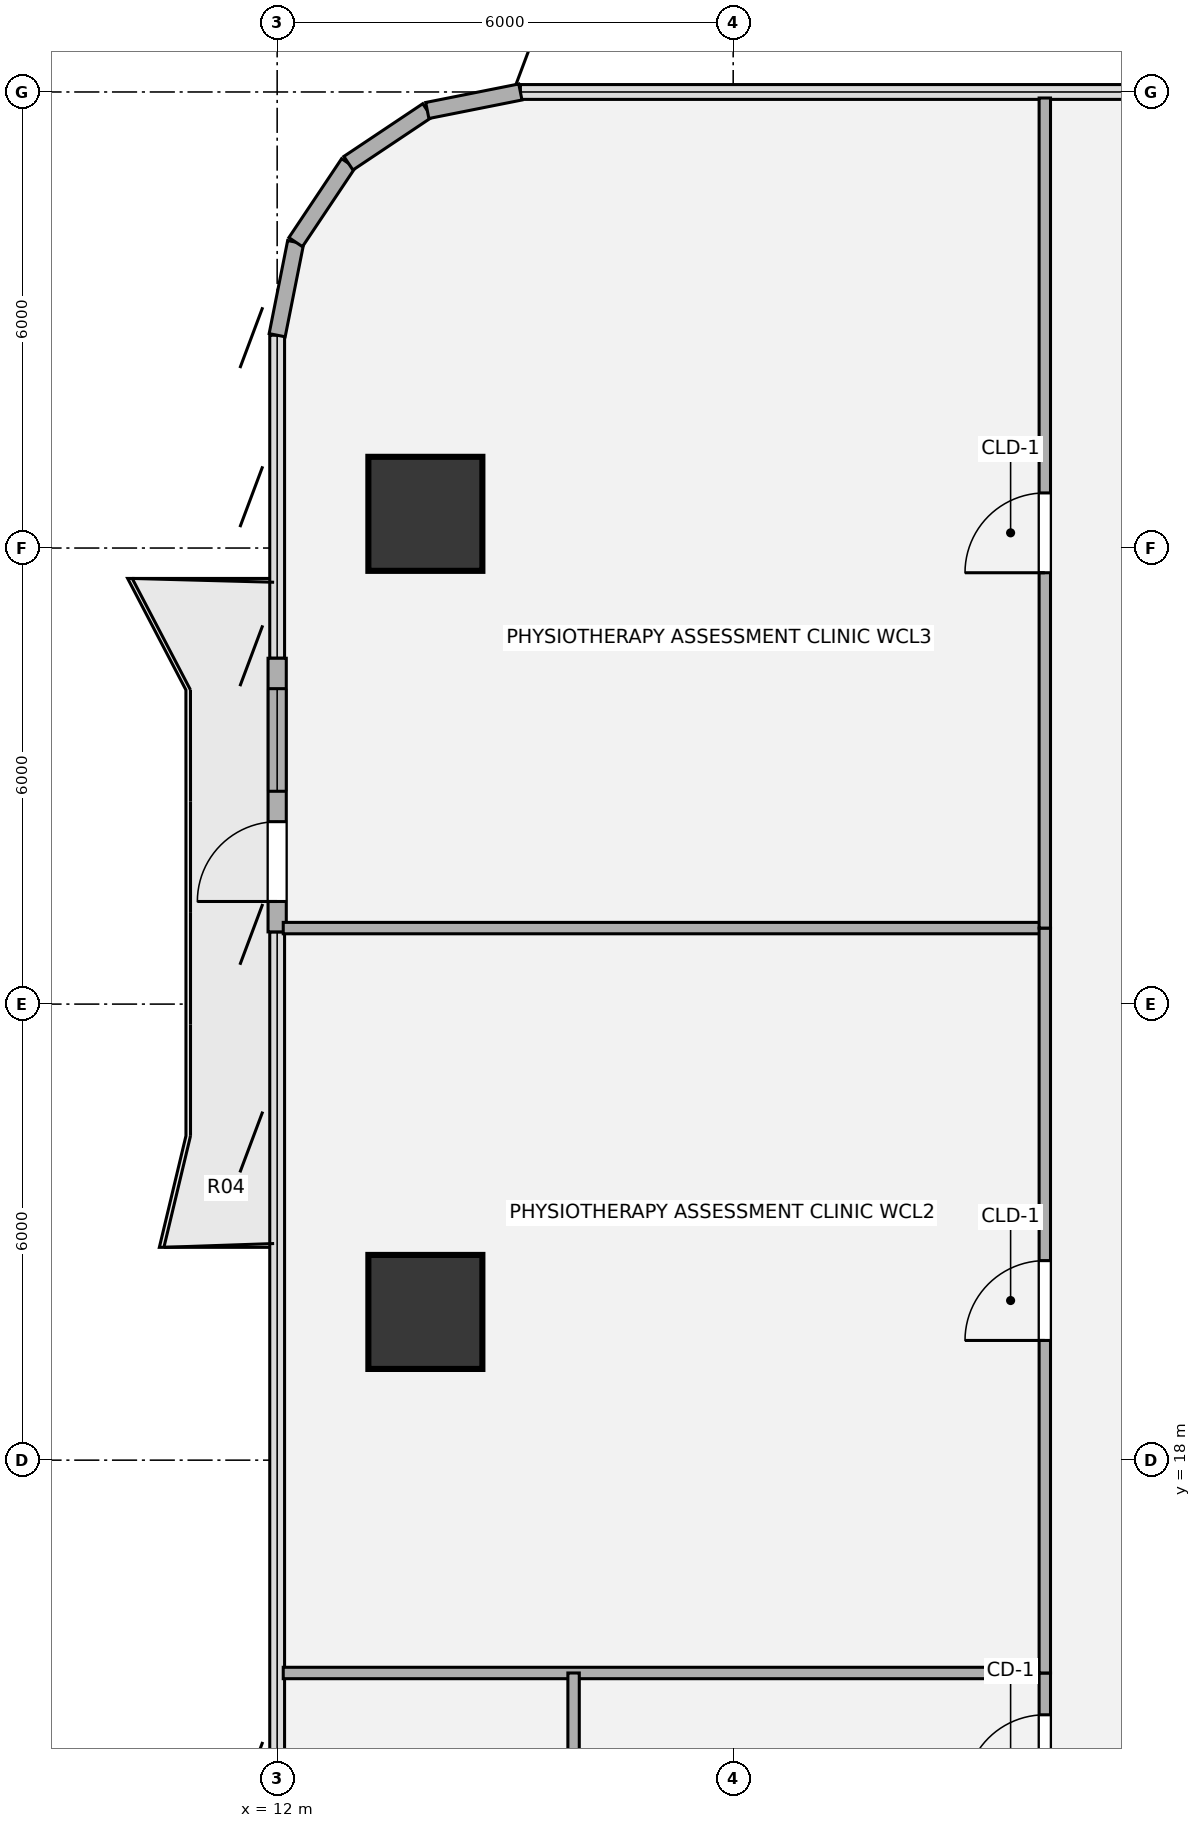
"""IFC4 building model, lengths in metres.
Left out: names, types, materials, properties, quantities, classifications, styles, units other than length and angle.
Written with IfcOpenShell. Run it as: python <this file> out.ifc"""

import sys

from ifc_helpers import new_model, si_unit, direction, frame, frame_2d, origin, origin_2d, place, context, subcontext, project, spatial, rectangle, hollow_circle, extrude, source, transform, mapped, element, fill, save


model = new_model("IFC4")
c1 = context("Model", 3, precision=1e-05, world=origin(), true_north=direction((0.0, 1.0)))
c2 = subcontext(c1, "Body", "Model", "MODEL_VIEW")
j1 = project(units=[si_unit("LENGTHUNIT", "METRE"), si_unit("PLANEANGLEUNIT", "RADIAN")], contexts=[c1])
p1 = place(None, origin())
s1 = spatial("IfcSite", under=j1, at=p1, CompositionType="ELEMENT")
p2 = place(p1, origin())
s2 = spatial("IfcBuilding", under=s1, at=p2, CompositionType="ELEMENT")
p3 = place(p2, frame((0.0, 0.0, 45.9)))
s3 = spatial("IfcBuildingStorey", under=s2, at=p3, CompositionType="ELEMENT", Elevation=45.9)
m1 = source(origin(), c2, "Body", "SweptSolid", [
    extrude(hollow_circle(Radius=0.75, WallThickness=0.05, at=origin_2d()), origin(), (0.0, 0.0, 1.0), 3.78),
])
for number, where, z_axis, x_axis in (
    (1, (13.95, 19.95, 0.0), (0.0, 0.0, 1.0), (1.0, 0.0, 0.0)),
    (2, (13.95, 30.45, 0.0), (0.0, 0.0, 1.0), (1.0, 0.0, 0.0)),
):
    element("IfcColumn", number, at=place(p3, frame(where, z_axis=z_axis, x_axis=x_axis)), inside=s3, PredefinedType="COLUMN", context=c2, shape_type="MappedRepresentation", body=[
        mapped(m1, transform((0.0, 0.0, 0.0), x_axis=(1.0, 0.0, 0.0), y_axis=(0.0, 1.0, 0.0), z_axis=(0.0, 0.0, 1.0), scale=1.0)),
    ])
p4 = place(p3, frame((12.0, 24.95, 0.0), z_axis=(0.0, 0.0, 1.0), x_axis=(0.0, 1.0, 0.0)))
e3 = element("IfcWall", 3, at=p4, inside=s3, PredefinedType="SOLIDWALL", context=c2, shape_type="SweptSolid", body=[
    extrude(rectangle(XDim=3.6, YDim=0.24, at=frame_2d((1.8, 0.0))), origin(), (0.0, 0.0, 1.0), 3.53),
])
p5 = place(p4, frame((0.4, 0.0, 0.0)))
e4 = element("IfcOpeningElement", 4, at=p5, cuts=e3, PredefinedType="OPENING", context=c2, shape_type="SweptSolid", body=[
    extrude(rectangle(XDim=1.05, YDim=2.15, at=origin_2d()), frame((0.525, 0.13, 1.075), z_axis=(0.0, -1.0, 0.0), x_axis=(1.0, 0.0, 0.0)), (0.0, 0.0, 1.0), 0.26),
])
p6 = place(p4, frame((1.85, 0.0, 0.85)))
e5 = element("IfcOpeningElement", 5, at=p6, cuts=e3, PredefinedType="OPENING", context=c2, shape_type="SweptSolid", body=[
    extrude(rectangle(XDim=1.35, YDim=1.35, at=origin_2d()), frame((0.675, 0.13, 0.675), z_axis=(0.0, -1.0, 0.0), x_axis=(1.0, 0.0, 0.0)), (0.0, 0.0, 1.0), 0.26),
])
for number, where, z_axis, x_axis in (
    (6, (12.0, 32.8, 0.0), (0.0, 0.0, 1.0), (0.195, 0.981, 0.0)),
    (7, (12.244, 34.025, 0.0), (0.0, 0.0, 1.0), (0.556, 0.831, 0.0)),
    (8, (12.937, 35.063, 0.0), (0.0, 0.0, 1.0), (0.831, 0.556, 0.0)),
    (9, (13.975, 35.756, 0.0), (0.0, 0.0, 1.0), (0.981, 0.195, 0.0)),
):
    element("IfcWall", number, at=place(p3, frame(where, z_axis=z_axis, x_axis=x_axis)), inside=s3, PredefinedType="SOLIDWALL", context=c2, shape_type="SweptSolid", body=[
        extrude(rectangle(XDim=1.249, YDim=0.215, at=frame_2d((0.624, 0.0))), origin(), (0.0, 0.0, 1.0), 3.53),
    ])
p7 = place(p3, frame((12.08, 15.2, 0.0), z_axis=(0.0, 0.0, 1.0), x_axis=(1.0, 0.0, 0.0)))
e10 = element("IfcWall", 10, at=p7, inside=s3, PredefinedType="PARTITIONING", context=c2, shape_type="SweptSolid", body=[
    extrude(rectangle(XDim=10.02, YDim=0.15, at=frame_2d((5.01, 0.0))), origin(), (0.0, 0.0, 1.0), 3.5),
])
p8 = place(p3, frame((12.08, 25.0, 0.0), z_axis=(0.0, 0.0, 1.0), x_axis=(1.0, 0.0, 0.0)))
e11 = element("IfcWall", 11, at=p8, inside=s3, PredefinedType="PARTITIONING", context=c2, shape_type="SweptSolid", body=[
    extrude(rectangle(XDim=10.02, YDim=0.15, at=frame_2d((5.01, 0.0))), origin(), (0.0, 0.0, 1.0), 2.982),
])
p9 = place(p3, frame((15.9, 10.64, 0.0), z_axis=(0.0, 0.0, 1.0), x_axis=(0.0, 1.0, 0.0)))
e12 = element("IfcWall", 12, at=p9, inside=s3, PredefinedType="PARTITIONING", context=c2, shape_type="SweptSolid", body=[
    extrude(rectangle(XDim=4.56, YDim=0.15, at=frame_2d((2.28, 0.0))), origin(), (0.0, 0.0, 1.0), 3.5),
])
p10 = place(p9, frame((1.9, 0.0, 0.0)))
e13 = element("IfcOpeningElement", 13, at=p10, cuts=e12, PredefinedType="OPENING", context=c2, shape_type="SweptSolid", body=[
    extrude(rectangle(XDim=0.86, YDim=2.1, at=origin_2d()), frame((0.43, 0.085, 1.05), z_axis=(0.0, -1.0, 0.0), x_axis=(1.0, 0.0, 0.0)), (0.0, 0.0, 1.0), 0.17),
])
p11 = place(p3, frame((22.1, 13.04, 0.0), z_axis=(0.0, 0.0, 1.0), x_axis=(0.0, 1.0, 0.0)))
e14 = element("IfcWall", 14, at=p11, inside=s3, PredefinedType="PARTITIONING", context=c2, shape_type="SweptSolid", body=[
    extrude(rectangle(XDim=2.16, YDim=0.15, at=frame_2d((1.08, 0.0))), origin(), (0.0, 0.0, 1.0), 3.5),
])
p12 = place(p11, frame((0.56, 0.0, 0.0)))
e15 = element("IfcOpeningElement", 15, at=p12, cuts=e14, PredefinedType="OPENING", context=c2, shape_type="SweptSolid", body=[
    extrude(rectangle(XDim=1.05, YDim=2.1, at=origin_2d()), frame((0.525, 0.085, 1.05), z_axis=(0.0, -1.0, 0.0), x_axis=(1.0, 0.0, 0.0)), (0.0, 0.0, 1.0), 0.17),
])
p13 = place(p3, frame((22.1, 15.2, 0.0), z_axis=(0.0, 0.0, 1.0), x_axis=(0.0, 1.0, 0.0)))
e16 = element("IfcWall", 16, at=p13, inside=s3, PredefinedType="PARTITIONING", context=c2, shape_type="SweptSolid", body=[
    extrude(rectangle(XDim=9.8, YDim=0.15, at=frame_2d((4.9, 0.0))), origin(), (0.0, 0.0, 1.0), 3.5),
])
p14 = place(p13, frame((4.375, 0.0, 0.0)))
e17 = element("IfcOpeningElement", 17, at=p14, cuts=e16, PredefinedType="OPENING", context=c2, shape_type="SweptSolid", body=[
    extrude(rectangle(XDim=1.05, YDim=2.1, at=origin_2d()), frame((0.525, 0.085, 1.05), z_axis=(0.0, -1.0, 0.0), x_axis=(1.0, 0.0, 0.0)), (0.0, 0.0, 1.0), 0.17),
])
p15 = place(p3, frame((22.1, 25.0, 0.0), z_axis=(0.0, 0.0, 1.0), x_axis=(0.0, 1.0, 0.0)))
e18 = element("IfcWall", 18, at=p15, inside=s3, PredefinedType="PARTITIONING", context=c2, shape_type="SweptSolid", body=[
    extrude(rectangle(XDim=10.921, YDim=0.15, at=frame_2d((5.46, 0.0))), origin(), (0.0, 0.0, 1.0), 3.5),
])
p16 = place(p15, frame((4.675, 0.0, 0.0)))
e19 = element("IfcOpeningElement", 19, at=p16, cuts=e18, PredefinedType="OPENING", context=c2, shape_type="SweptSolid", body=[
    extrude(rectangle(XDim=1.05, YDim=2.1, at=origin_2d()), frame((0.525, 0.085, 1.05), z_axis=(0.0, -1.0, 0.0), x_axis=(1.0, 0.0, 0.0)), (0.0, 0.0, 1.0), 0.17),
])
m2 = source(origin(), c2, "Body", "SweptSolid", [
    extrude(rectangle(XDim=1.05, YDim=2.15, at=origin_2d()), frame((0.525, 0.025, 1.075), z_axis=(0.0, -1.0, 0.0), x_axis=(1.0, 0.0, 0.0)), (0.0, 0.0, 1.0), 0.05),
])
p17 = place(p5, origin())
e20 = element("IfcDoor", 20, at=p17, inside=s3, OperationType="SINGLE_SWING_LEFT", PredefinedType="DOOR", context=c2, shape_type="MappedRepresentation", body=[
    mapped(m2, transform((0.0, 0.0, 0.0), x_axis=(1.0, 0.0, 0.0), y_axis=(0.0, 1.0, 0.0), z_axis=(0.0, 0.0, 1.0), scale=1.0)),
])
fill(e4, e20)
m3 = source(origin(), c2, "Body", "SweptSolid", [
    extrude(rectangle(XDim=1.35, YDim=1.35, at=origin_2d()), frame((0.675, 0.03, 0.675), z_axis=(0.0, -1.0, 0.0), x_axis=(1.0, 0.0, 0.0)), (0.0, 0.0, 1.0), 0.06),
])
p18 = place(p6, origin())
e21 = element("IfcWindow", 21, at=p18, inside=s3, PartitioningType="SINGLE_PANEL", PredefinedType="WINDOW", context=c2, shape_type="MappedRepresentation", body=[
    mapped(m3, transform((0.0, 0.0, 0.0), x_axis=(1.0, 0.0, 0.0), y_axis=(0.0, 1.0, 0.0), z_axis=(0.0, 0.0, 1.0), scale=1.0)),
])
fill(e5, e21)
m4 = source(origin(), c2, "Body", "SweptSolid", [
    extrude(rectangle(XDim=1.05, YDim=2.1, at=origin_2d()), frame((0.525, 0.025, 1.05), z_axis=(0.0, -1.0, 0.0), x_axis=(1.0, 0.0, 0.0)), (0.0, 0.0, 1.0), 0.05),
])
p19 = place(p12, origin())
e22 = element("IfcDoor", 22, at=p19, inside=s3, OperationType="SINGLE_SWING_LEFT", PredefinedType="DOOR", context=c2, shape_type="MappedRepresentation", body=[
    mapped(m4, transform((0.0, 0.0, 0.0), x_axis=(1.0, 0.0, 0.0), y_axis=(0.0, 1.0, 0.0), z_axis=(0.0, 0.0, 1.0), scale=1.0)),
])
fill(e15, e22)
m5 = source(origin(), c2, "Body", "SweptSolid", [
    extrude(rectangle(XDim=1.05, YDim=2.1, at=origin_2d()), frame((0.525, 0.025, 1.05), z_axis=(0.0, -1.0, 0.0), x_axis=(1.0, 0.0, 0.0)), (0.0, 0.0, 1.0), 0.05),
])
p20 = place(p14, origin())
e23 = element("IfcDoor", 23, at=p20, inside=s3, OperationType="SINGLE_SWING_LEFT", PredefinedType="DOOR", context=c2, shape_type="MappedRepresentation", body=[
    mapped(m5, transform((0.0, 0.0, 0.0), x_axis=(1.0, 0.0, 0.0), y_axis=(0.0, 1.0, 0.0), z_axis=(0.0, 0.0, 1.0), scale=1.0)),
])
fill(e17, e23)
p21 = place(p16, origin())
e24 = element("IfcDoor", 24, at=p21, inside=s3, OperationType="SINGLE_SWING_LEFT", PredefinedType="DOOR", context=c2, shape_type="MappedRepresentation", body=[
    mapped(m5, transform((0.0, 0.0, 0.0), x_axis=(1.0, 0.0, 0.0), y_axis=(0.0, 1.0, 0.0), z_axis=(0.0, 0.0, 1.0), scale=1.0)),
])
fill(e19, e24)
save(model, sys.argv[1])
